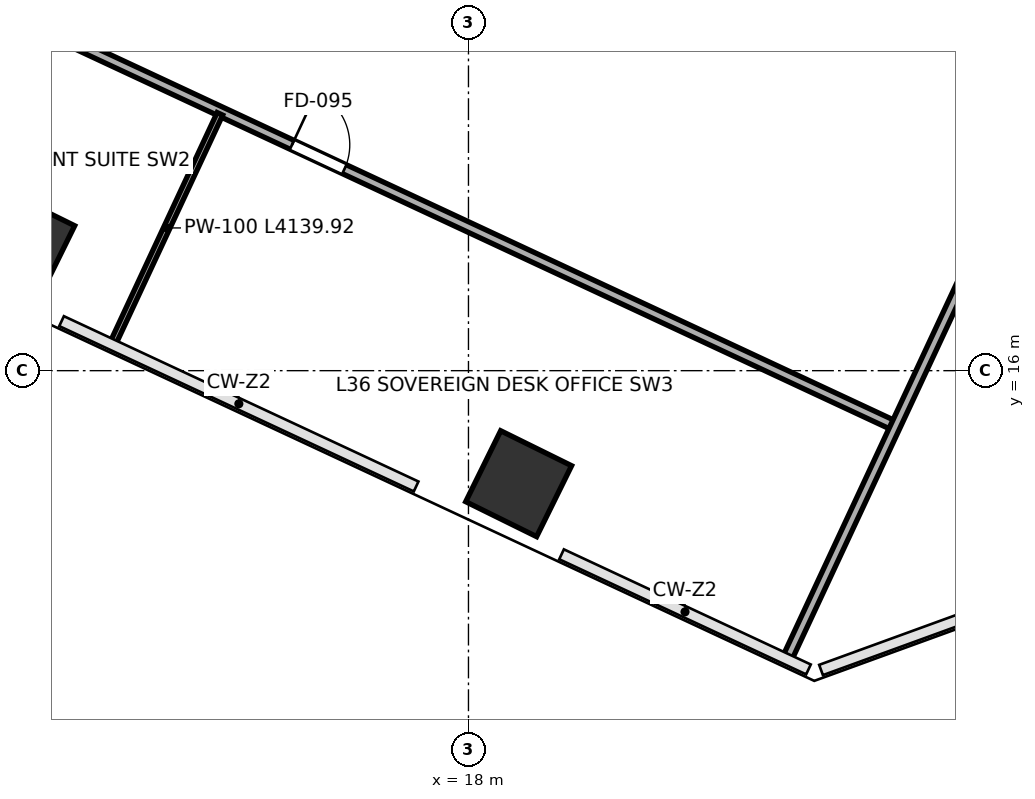
"""IFC4 building model, lengths in metres.
Left out: names, types, materials, properties, quantities, classifications, styles, units other than length and angle.
Written with IfcOpenShell. Run it as: python <this file> out.ifc"""

import sys

from ifc_helpers import new_model, si_unit, direction, frame, frame_2d, origin, origin_2d, place, context, subcontext, project, spatial, rectangle, extrude, clip, halfspace, source, transform, mapped, element, fill, save


model = new_model("IFC4")
c1 = context("Model", 3, precision=1e-05, world=origin(), true_north=direction((0.0, 1.0)))
c2 = subcontext(c1, "Body", "Model", "MODEL_VIEW")
j1 = project(units=[si_unit("LENGTHUNIT", "METRE"), si_unit("PLANEANGLEUNIT", "RADIAN")], contexts=[c1])
p1 = place(None, origin())
s1 = spatial("IfcSite", under=j1, at=p1, CompositionType="ELEMENT")
p2 = place(p1, origin())
s2 = spatial("IfcBuilding", under=s1, at=p2, CompositionType="ELEMENT")
p3 = place(p2, frame((0.0, 0.0, 162.4)))
s3 = spatial("IfcBuildingStorey", under=s2, at=p3, CompositionType="ELEMENT", Elevation=162.4)
p4 = place(p3, frame((10.754, 18.122, 0.0), z_axis=(-0.071199539327, 0.056380773418, 0.995867377711), x_axis=(0.90208675184, 0.429681267702, 0.040168399792)))
e1 = element("IfcColumn", 1, at=p4, inside=s3, PredefinedType="COLUMN", context=c2, shape_type="Clipping", body=[
    clip(clip(extrude(rectangle(XDim=1.15, YDim=1.15, at=origin_2d()), origin(), (0.0, 0.0, 1.0), 4.218), halfspace(frame((0.0, 0.0, 0.071), z_axis=(0.0, 0.0, -1.0), x_axis=(1.0, 0.0, 0.0)), False)), halfspace(frame((0.0, 0.0, 4.146), z_axis=(0.0, 0.0, 1.0), x_axis=(1.0, 0.0, 0.0)), False)),
])
p5 = place(p3, frame((18.825, 14.141, 0.0), z_axis=(-0.092190137628, 0.014873110716, 0.995630337576), x_axis=(0.577581004386, 0.815287886599, 0.041301880559)))
e2 = element("IfcColumn", 2, at=p5, inside=s3, PredefinedType="COLUMN", context=c2, shape_type="Clipping", body=[
    clip(clip(extrude(rectangle(XDim=1.3, YDim=1.3, at=origin_2d()), origin(), (0.0, 0.0, 1.0), 4.219), halfspace(frame((0.0, 0.0, 0.082), z_axis=(0.0, 0.0, -1.0), x_axis=(1.0, 0.0, 0.0)), False)), halfspace(frame((0.0, 0.0, 4.136), z_axis=(0.0, 0.0, 1.0), x_axis=(1.0, 0.0, 0.0)), False)),
])
p6 = place(p3, frame((7.213, 23.391, 0.0), z_axis=(0.0, 0.0, 1.0), x_axis=(0.906304602938, -0.422625089996, 0.0)))
e3 = element("IfcWall", 3, at=p6, inside=s3, PredefinedType="PARTITIONING", context=c2, shape_type="SweptSolid", body=[
    extrude(rectangle(XDim=19.61, YDim=0.16, at=frame_2d((9.805, 0.0))), origin(), (0.0, 0.0, 1.0), 3.96),
])
p7 = place(p6, frame((1.45, 0.0, 0.0)))
e4 = element("IfcOpeningElement", 4, at=p7, cuts=e3, PredefinedType="OPENING", context=c2, shape_type="SweptSolid", body=[
    extrude(rectangle(XDim=0.95, YDim=2.15, at=frame_2d((0.475, 1.075))), frame((0.0, 0.09, 0.0), z_axis=(0.0, -1.0, 0.0), x_axis=(1.0, 0.0, 0.0)), (0.0, 0.0, 1.0), 0.18),
])
p8 = place(p6, frame((8.7, 0.0, 0.0)))
e5 = element("IfcOpeningElement", 5, at=p8, cuts=e3, PredefinedType="OPENING", context=c2, shape_type="SweptSolid", body=[
    extrude(rectangle(XDim=0.95, YDim=2.15, at=frame_2d((0.475, 1.075))), frame((0.0, 0.09, 0.0), z_axis=(0.0, -1.0, 0.0), x_axis=(1.0, 0.0, 0.0)), (0.0, 0.0, 1.0), 0.18),
])
p9 = place(p3, frame((12.162, 16.471, 0.0), z_axis=(0.0, 0.0, 1.0), x_axis=(0.422656233697, 0.906290079454, 0.0)))
e6 = element("IfcWall", 6, at=p9, inside=s3, PredefinedType="PARTITIONING", context=c2, shape_type="SweptSolid", body=[
    extrude(rectangle(XDim=4.14, YDim=0.1, at=frame_2d((2.07, 0.0))), origin(), (0.0, 0.0, 1.0), 3.195),
])
p10 = place(p3, frame((23.256, 11.299, 0.0), z_axis=(0.0, 0.0, 1.0), x_axis=(0.422623489462, 0.906305349292, 0.0)))
e7 = element("IfcWall", 7, at=p10, inside=s3, PredefinedType="PARTITIONING", context=c2, shape_type="SweptSolid", body=[
    extrude(rectangle(XDim=21.48, YDim=0.16, at=frame_2d((10.74, 0.0))), origin(), (0.0, 0.0, 1.0), 3.96),
])
m1 = source(origin(), c2, "Body", "SweptSolid", [
    extrude(rectangle(XDim=0.95, YDim=2.15, at=frame_2d((0.475, 1.075))), frame((0.0, 0.025, 0.0), z_axis=(0.0, -1.0, 0.0), x_axis=(1.0, 0.0, 0.0)), (0.0, 0.0, 1.0), 0.05),
])
p11 = place(p8, origin())
e8 = element("IfcDoor", 8, at=p11, inside=s3, OperationType="SINGLE_SWING_LEFT", PredefinedType="DOOR", context=c2, shape_type="MappedRepresentation", body=[
    mapped(m1, transform((0.0, 0.0, 0.0), scale=1.0)),
])
fill(e5, e8)
save(model, sys.argv[1])
